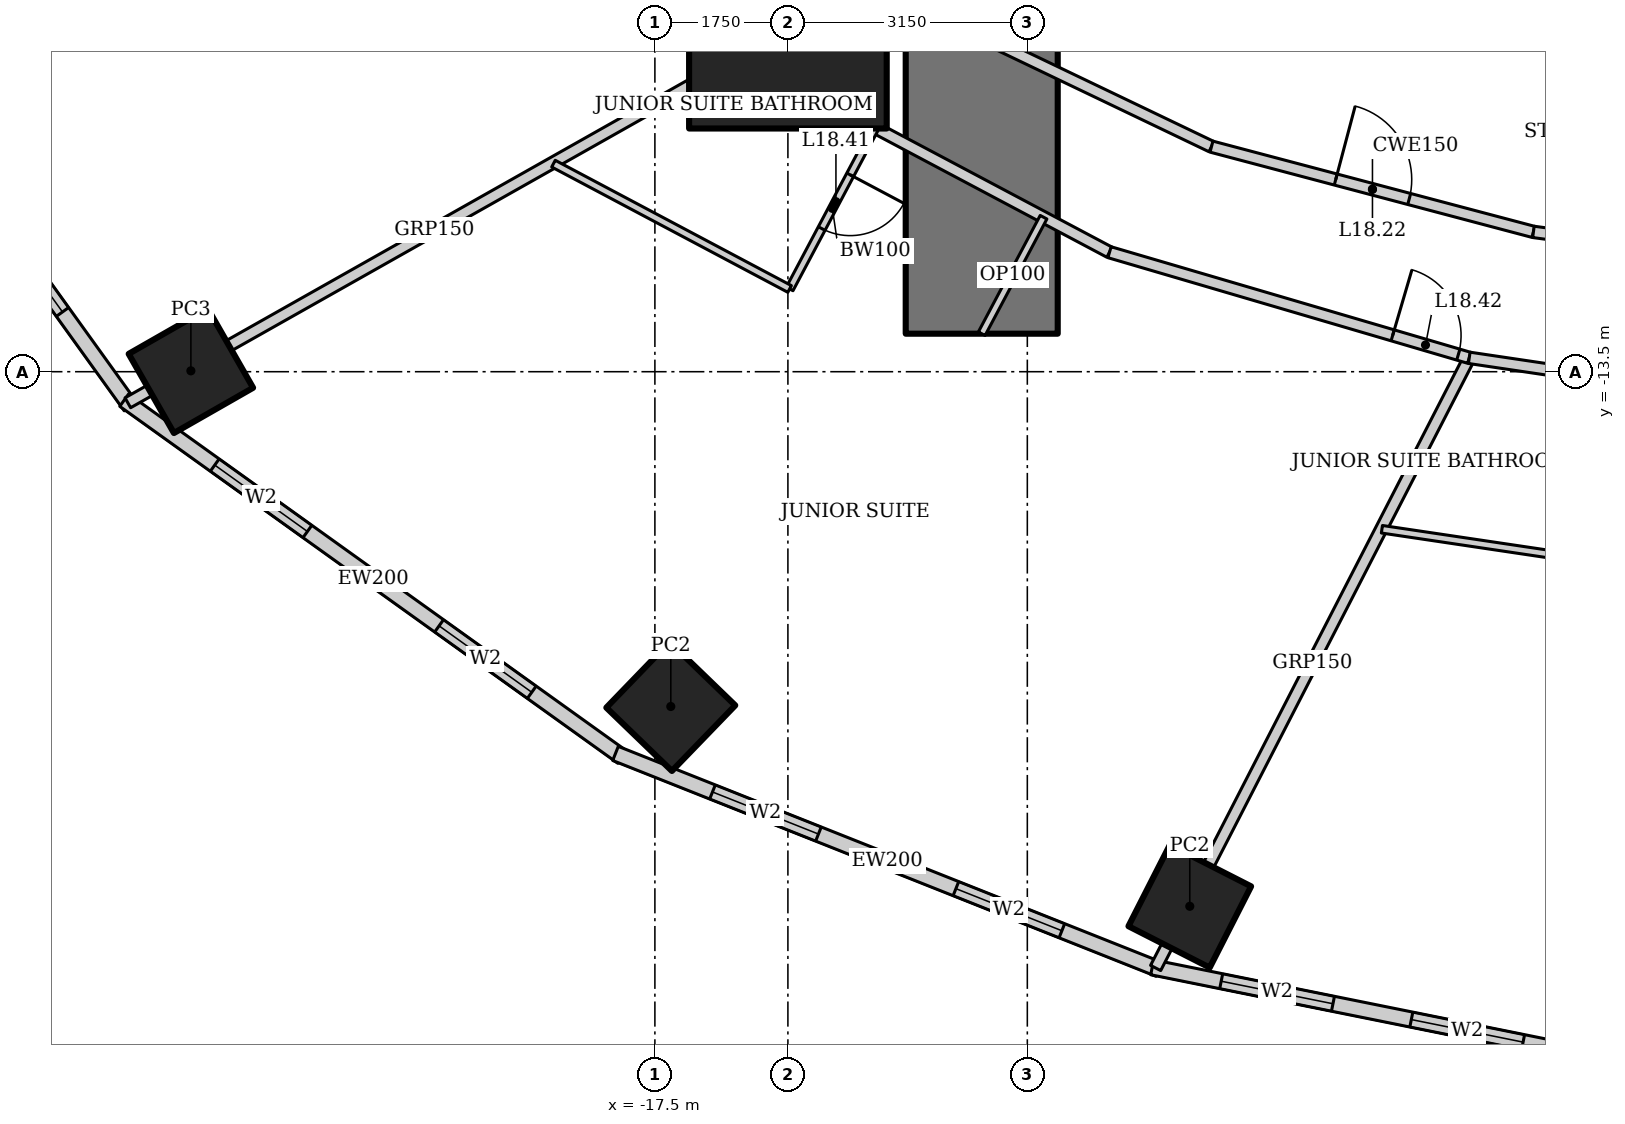
"""IFC4 building model, lengths in metres.
Left out: names, types, materials, properties, quantities, classifications, styles, units other than length and angle.
Written with IfcOpenShell. Run it as: python <this file> out.ifc"""

import sys

from ifc_helpers import new_model, si_unit, direction, frame, frame_2d, origin, origin_2d, place, context, subcontext, project, spatial, rectangle, hollow_rectangle, extrude, element, fill, save


model = new_model("IFC4")
c1 = context("Model", 3, precision=1e-05, world=origin(), true_north=direction((0.0, 1.0)))
c2 = subcontext(c1, "Body", "Model", "MODEL_VIEW")
j1 = project(units=[si_unit("LENGTHUNIT", "METRE"), si_unit("PLANEANGLEUNIT", "RADIAN")], contexts=[c1])
p1 = place(None, origin())
s1 = spatial("IfcSite", under=j1, at=p1, CompositionType="ELEMENT")
p2 = place(p1, origin())
s2 = spatial("IfcBuilding", under=s1, at=p2, CompositionType="ELEMENT")
p3 = place(p2, frame((0.0, 0.0, 80.2)))
s3 = spatial("IfcBuildingStorey", under=s2, at=p3, CompositionType="ELEMENT", Elevation=80.2)
p4 = place(p3, frame((-15.75, -9.0, 0.0), z_axis=(0.0, 0.0, 1.0), x_axis=(1.0, 0.0, 0.0)))
e1 = element("IfcColumn", 1, at=p4, inside=s3, PredefinedType="COLUMN", context=c2, shape_type="SweptSolid", body=[
    extrude(hollow_rectangle(XDim=2.6, YDim=2.6, WallThickness=0.13, at=origin_2d()), origin(), (0.0, 0.0, 1.0), 3.6),
])
p5 = place(p3, frame((-23.605, -13.489, 0.0), z_axis=(0.0, 0.0, 1.0), x_axis=(0.86824298017, 0.496139221777, 0.0)))
e2 = element("IfcColumn", 2, at=p5, inside=s3, PredefinedType="COLUMN", context=c2, shape_type="SweptSolid", body=[
    extrude(hollow_rectangle(XDim=1.2, YDim=1.2, WallThickness=0.12, at=origin_2d()), origin(), (0.0, 0.0, 1.0), 3.6),
])
for number, where, z_axis, x_axis in (
    (3, (-17.291, -17.905, 0.0), (0.0, 0.0, 1.0), (0.695, 0.719, 0.0)),
    (4, (-10.463, -20.534, 0.0), (0.0, 0.0, 1.0), (0.454, 0.891, 0.0)),
):
    element("IfcColumn", number, at=place(p3, frame(where, z_axis=z_axis, x_axis=x_axis)), inside=s3, PredefinedType="COLUMN", context=c2, shape_type="SweptSolid", body=[
        extrude(hollow_rectangle(XDim=1.2, YDim=1.2, WallThickness=0.1, at=origin_2d()), origin(), (0.0, 0.0, 1.0), 3.6),
    ])
p6 = place(p3, frame((-13.2, 13.0, 0.0), z_axis=(0.0, 0.0, 1.0), x_axis=(0.0, -1.0, 0.0)))
e5 = element("IfcWall", 5, at=p6, inside=s3, PredefinedType="SHEAR", context=c2, shape_type="SweptSolid", body=[
    extrude(rectangle(XDim=26.0, YDim=2.0, at=frame_2d((13.0, 0.0))), origin(), (0.0, 0.0, 1.0), 3.6),
])
p7 = place(p6, frame((12.1, 0.0, 0.0)))
e6 = element("IfcOpeningElement", 6, at=p7, cuts=e5, PredefinedType="OPENING", context=c2, shape_type="SweptSolid", body=[
    extrude(rectangle(XDim=1.8, YDim=2.1, at=frame_2d((0.9, 1.05))), frame((0.0, 1.01, 0.0), z_axis=(0.0, -1.0, 0.0), x_axis=(1.0, 0.0, 0.0)), (0.0, 0.0, 1.0), 2.02),
])
p8 = place(p3, frame((-29.26, -7.2, 0.0), z_axis=(0.0, 0.0, 1.0), x_axis=(0.583937613703, -0.811798536155, 0.0)))
e7 = element("IfcWall", 7, at=p8, inside=s3, PredefinedType="SOLIDWALL", context=c2, shape_type="SweptSolid", body=[
    extrude(rectangle(XDim=8.323, YDim=0.2, at=frame_2d((4.162, 0.0))), origin(), (0.0, 0.0, 1.0), 3.45),
])
p9 = place(p8, frame((1.531, 0.0, 0.5)))
e8 = element("IfcOpeningElement", 8, at=p9, cuts=e7, PredefinedType="OPENING", context=c2, shape_type="SweptSolid", body=[
    extrude(rectangle(XDim=1.5, YDim=2.2, at=frame_2d((0.75, 1.1))), frame((0.0, 0.11, 0.0), z_axis=(0.0, -1.0, 0.0), x_axis=(1.0, 0.0, 0.0)), (0.0, 0.0, 1.0), 0.22),
])
p10 = place(p8, frame((5.292, 0.0, 0.5)))
e9 = element("IfcOpeningElement", 9, at=p10, cuts=e7, PredefinedType="OPENING", context=c2, shape_type="SweptSolid", body=[
    extrude(rectangle(XDim=1.5, YDim=2.2, at=frame_2d((0.75, 1.1))), frame((0.0, 0.11, 0.0), z_axis=(0.0, -1.0, 0.0), x_axis=(1.0, 0.0, 0.0)), (0.0, 0.0, 1.0), 0.22),
])
p11 = place(p3, frame((-24.482, -13.875, 0.0), z_axis=(0.0, 0.0, 1.0), x_axis=(0.812791321576, -0.582554948112, 0.0)))
e10 = element("IfcWall", 10, at=p11, inside=s3, PredefinedType="SOLIDWALL", context=c2, shape_type="SweptSolid", body=[
    extrude(rectangle(XDim=8.063, YDim=0.2, at=frame_2d((4.032, 0.0))), origin(), (0.0, 0.0, 1.0), 3.45),
])
p12 = place(p11, frame((1.466, 0.0, 0.5)))
e11 = element("IfcOpeningElement", 11, at=p12, cuts=e10, PredefinedType="OPENING", context=c2, shape_type="SweptSolid", body=[
    extrude(rectangle(XDim=1.5, YDim=2.2, at=frame_2d((0.75, 1.1))), frame((0.0, 0.11, 0.0), z_axis=(0.0, -1.0, 0.0), x_axis=(1.0, 0.0, 0.0)), (0.0, 0.0, 1.0), 0.22),
])
p13 = place(p11, frame((5.097, 0.0, 0.5)))
e12 = element("IfcOpeningElement", 12, at=p13, cuts=e10, PredefinedType="OPENING", context=c2, shape_type="SweptSolid", body=[
    extrude(rectangle(XDim=1.5, YDim=2.2, at=frame_2d((0.75, 1.1))), frame((0.0, 0.11, 0.0), z_axis=(0.0, -1.0, 0.0), x_axis=(1.0, 0.0, 0.0)), (0.0, 0.0, 1.0), 0.22),
])
p14 = place(p3, frame((-18.018, -18.523, 0.0), z_axis=(0.0, 0.0, 1.0), x_axis=(0.929358351251, -0.369178892895, 0.0)))
e13 = element("IfcWall", 13, at=p14, inside=s3, PredefinedType="SOLIDWALL", context=c2, shape_type="SweptSolid", body=[
    extrude(rectangle(XDim=7.692, YDim=0.2, at=frame_2d((3.846, 0.0))), origin(), (0.0, 0.0, 1.0), 3.45),
])
p15 = place(p14, frame((1.373, 0.0, 0.5)))
e14 = element("IfcOpeningElement", 14, at=p15, cuts=e13, PredefinedType="OPENING", context=c2, shape_type="SweptSolid", body=[
    extrude(rectangle(XDim=1.5, YDim=2.2, at=frame_2d((0.75, 1.1))), frame((0.0, 0.11, 0.0), z_axis=(0.0, -1.0, 0.0), x_axis=(1.0, 0.0, 0.0)), (0.0, 0.0, 1.0), 0.22),
])
p16 = place(p14, frame((4.819, 0.0, 0.5)))
e15 = element("IfcOpeningElement", 15, at=p16, cuts=e13, PredefinedType="OPENING", context=c2, shape_type="SweptSolid", body=[
    extrude(rectangle(XDim=1.5, YDim=2.2, at=frame_2d((0.75, 1.1))), frame((0.0, 0.11, 0.0), z_axis=(0.0, -1.0, 0.0), x_axis=(1.0, 0.0, 0.0)), (0.0, 0.0, 1.0), 0.22),
])
p17 = place(p3, frame((-10.957, -21.337, 0.0), z_axis=(0.0, 0.0, 1.0), x_axis=(0.980251657452, -0.197754110105, 0.0)))
e16 = element("IfcWall", 16, at=p17, inside=s3, PredefinedType="SOLIDWALL", context=c2, shape_type="SweptSolid", body=[
    extrude(rectangle(XDim=5.904, YDim=0.2, at=frame_2d((2.952, 0.0))), origin(), (0.0, 0.0, 1.0), 3.45),
])
p18 = place(p17, frame((0.926, 0.0, 0.5)))
e17 = element("IfcOpeningElement", 17, at=p18, cuts=e16, PredefinedType="OPENING", context=c2, shape_type="SweptSolid", body=[
    extrude(rectangle(XDim=1.5, YDim=2.2, at=frame_2d((0.75, 1.1))), frame((0.0, 0.11, 0.0), z_axis=(0.0, -1.0, 0.0), x_axis=(1.0, 0.0, 0.0)), (0.0, 0.0, 1.0), 0.22),
])
p19 = place(p17, frame((3.478, 0.0, 0.5)))
e18 = element("IfcOpeningElement", 18, at=p19, cuts=e16, PredefinedType="OPENING", context=c2, shape_type="SweptSolid", body=[
    extrude(rectangle(XDim=1.5, YDim=2.2, at=frame_2d((0.75, 1.1))), frame((0.0, 0.11, 0.0), z_axis=(0.0, -1.0, 0.0), x_axis=(1.0, 0.0, 0.0)), (0.0, 0.0, 1.0), 0.22),
])
p20 = place(p3, frame((-24.435, -13.909, 0.0), z_axis=(0.0, 0.0, 1.0), x_axis=(0.870744406136, 0.491735883563, 0.0)))
e19 = element("IfcWall", 19, at=p20, inside=s3, PredefinedType="PARTITIONING", context=c2, shape_type="SweptSolid", body=[
    extrude(rectangle(XDim=9.263, YDim=0.15, at=frame_2d((4.631, 0.0))), origin(), (0.0, 0.0, 1.0), 2.693),
])
p21 = place(p3, frame((-10.912, -21.346, 0.0), z_axis=(0.0, 0.0, 1.0), x_axis=(0.457117602022, 0.889406261458, 0.0)))
e20 = element("IfcWall", 20, at=p21, inside=s3, PredefinedType="PARTITIONING", context=c2, shape_type="SweptSolid", body=[
    extrude(rectangle(XDim=9.027, YDim=0.15, at=frame_2d((4.513, 0.0))), origin(), (0.0, 0.0, 1.0), 2.528),
])
p22 = place(p3, frame((-20.484, -5.107, 0.0), z_axis=(0.0, 0.0, 1.0), x_axis=(0.695871090686, -0.71816671125, 0.0)))
e21 = element("IfcWall", 21, at=p22, inside=s3, PredefinedType="PARTITIONING", context=c2, shape_type="SweptSolid", body=[
    extrude(rectangle(XDim=5.913, YDim=0.15, at=frame_2d((2.957, 0.0))), origin(), (0.0, 0.0, 1.0), 3.45),
])
p23 = place(p22, frame((0.15, 0.0, 0.0)))
e22 = element("IfcOpeningElement", 22, at=p23, cuts=e21, PredefinedType="OPENING", context=c2, shape_type="SweptSolid", body=[
    extrude(rectangle(XDim=0.9, YDim=2.1, at=frame_2d((0.45, 1.05))), frame((0.0, 0.085, 0.0), z_axis=(0.0, -1.0, 0.0), x_axis=(1.0, 0.0, 0.0)), (0.0, 0.0, 1.0), 0.17),
])
p24 = place(p3, frame((-16.369, -9.354, 0.0), z_axis=(0.0, 0.0, 1.0), x_axis=(0.883334368785, -0.468743419071, 0.0)))
e23 = element("IfcWall", 23, at=p24, inside=s3, PredefinedType="PARTITIONING", context=c2, shape_type="SweptSolid", body=[
    extrude(rectangle(XDim=5.491, YDim=0.15, at=frame_2d((2.746, 0.0))), origin(), (0.0, 0.0, 1.0), 3.45),
])
p25 = place(p3, frame((-11.519, -11.928, 0.0), z_axis=(0.0, 0.0, 1.0), x_axis=(0.959496227294, -0.281721475589, 0.0)))
e24 = element("IfcWall", 24, at=p25, inside=s3, PredefinedType="PARTITIONING", context=c2, shape_type="SweptSolid", body=[
    extrude(rectangle(XDim=4.933, YDim=0.15, at=frame_2d((2.466, 0.0))), origin(), (0.0, 0.0, 1.0), 3.45),
])
p26 = place(p25, frame((3.883, 0.0, 0.0)))
e25 = element("IfcOpeningElement", 25, at=p26, cuts=e24, PredefinedType="OPENING", context=c2, shape_type="SweptSolid", body=[
    extrude(rectangle(XDim=0.9, YDim=2.1, at=frame_2d((0.45, 1.05))), frame((0.0, 0.085, 0.0), z_axis=(0.0, -1.0, 0.0), x_axis=(1.0, 0.0, 0.0)), (0.0, 0.0, 1.0), 0.17),
])
p27 = place(p3, frame((-6.786, -13.317, 0.0), z_axis=(0.0, 0.0, 1.0), x_axis=(0.989107488999, -0.14719502439, 0.0)))
e26 = element("IfcWall", 26, at=p27, inside=s3, PredefinedType="PARTITIONING", context=c2, shape_type="SweptSolid", body=[
    extrude(rectangle(XDim=3.627, YDim=0.15, at=frame_2d((1.814, 0.0))), origin(), (0.0, 0.0, 1.0), 3.45),
])
p28 = place(p3, frame((-14.673, -8.385, 0.0), z_axis=(0.0, 0.0, 1.0), x_axis=(0.901869692799, -0.43200816799, 0.0)))
e27 = element("IfcWall", 27, at=p28, inside=s3, PredefinedType="PARTITIONING", context=c2, shape_type="SweptSolid", body=[
    extrude(rectangle(XDim=4.986, YDim=0.15, at=frame_2d((2.493, 0.0))), origin(), (0.0, 0.0, 1.0), 3.45),
])
p29 = place(p3, frame((-10.177, -10.539, 0.0), z_axis=(0.0, 0.0, 1.0), x_axis=(0.966672790407, -0.256015070428, 0.0)))
e28 = element("IfcWall", 28, at=p29, inside=s3, PredefinedType="PARTITIONING", context=c2, shape_type="SweptSolid", body=[
    extrude(rectangle(XDim=4.382, YDim=0.15, at=frame_2d((2.191, 0.0))), origin(), (0.0, 0.0, 1.0), 3.45),
])
p30 = place(p29, frame((1.691, 0.0, 0.0)))
e29 = element("IfcOpeningElement", 29, at=p30, cuts=e28, PredefinedType="OPENING", context=c2, shape_type="SweptSolid", body=[
    extrude(rectangle(XDim=1.0, YDim=2.1, at=frame_2d((0.5, 1.05))), frame((0.0, 0.085, 0.0), z_axis=(0.0, -1.0, 0.0), x_axis=(1.0, 0.0, 0.0)), (0.0, 0.0, 1.0), 0.17),
])
p31 = place(p3, frame((-5.941, -11.66, 0.0), z_axis=(0.0, 0.0, 1.0), x_axis=(0.991129053928, -0.13290296633, 0.0)))
e30 = element("IfcWall", 30, at=p31, inside=s3, PredefinedType="PARTITIONING", context=c2, shape_type="SweptSolid", body=[
    extrude(rectangle(XDim=3.18, YDim=0.15, at=frame_2d((1.59, 0.0))), origin(), (0.0, 0.0, 1.0), 3.45),
])
p32 = place(p3, frame((-14.602, -10.291, 0.0), z_axis=(0.0, 0.0, 1.0), x_axis=(-0.468770886208, -0.883319792739, 0.0)))
e31 = element("IfcWall", 31, at=p32, inside=s3, PredefinedType="PARTITIONING", context=c2, shape_type="SweptSolid", body=[
    extrude(rectangle(XDim=2.4, YDim=0.1, at=frame_2d((1.2, 0.0))), origin(), (0.0, 0.0, 1.0), 3.45),
])
p33 = place(p32, frame((0.7, 0.0, 0.0)))
e32 = element("IfcOpeningElement", 32, at=p33, cuts=e31, PredefinedType="OPENING", context=c2, shape_type="SweptSolid", body=[
    extrude(rectangle(XDim=0.8, YDim=2.1, at=frame_2d((0.4, 1.05))), frame((0.0, 0.06, 0.0), z_axis=(0.0, -1.0, 0.0), x_axis=(1.0, 0.0, 0.0)), (0.0, 0.0, 1.0), 0.12),
])
p34 = place(p3, frame((-15.727, -12.411, 0.0), z_axis=(0.0, 0.0, 1.0), x_axis=(-0.88335195308, 0.468710280439, 0.0)))
e33 = element("IfcWall", 33, at=p34, inside=s3, PredefinedType="PARTITIONING", context=c2, shape_type="SweptSolid", body=[
    extrude(rectangle(XDim=3.518, YDim=0.1, at=frame_2d((1.759, 0.0))), origin(), (0.0, 0.0, 1.0), 3.45),
])
p35 = place(p3, frame((-5.161, -15.986, 0.0), z_axis=(0.0, 0.0, 1.0), x_axis=(-0.98910744157, 0.147195343104, 0.0)))
e34 = element("IfcWall", 34, at=p35, inside=s3, PredefinedType="PARTITIONING", context=c2, shape_type="SweptSolid", body=[
    extrude(rectangle(XDim=2.805, YDim=0.1, at=frame_2d((1.402, 0.0))), origin(), (0.0, 0.0, 1.0), 3.45),
])
p36 = place(p3, frame((-13.2, -13.0, 0.0), z_axis=(0.0, 0.0, 1.0), x_axis=(0.46874717052, 0.88333237806, 0.0)))
e35 = element("IfcWall", 35, at=p36, inside=s3, PredefinedType="PARTITIONING", context=c2, shape_type="SweptSolid", body=[
    extrude(rectangle(XDim=1.735, YDim=0.1, at=frame_2d((0.868, 0.0))), origin(), (0.0, 0.0, 1.0), 3.45),
])
p37 = place(p10, origin())
e36 = element("IfcWindow", 36, at=p37, inside=s3, PartitioningType="SINGLE_PANEL", PredefinedType="WINDOW", context=c2, shape_type="SweptSolid", body=[
    extrude(rectangle(XDim=1.5, YDim=2.2, at=frame_2d((0.75, 1.1))), frame((0.0, 0.03, 0.0), z_axis=(0.0, -1.0, 0.0), x_axis=(1.0, 0.0, 0.0)), (0.0, 0.0, 1.0), 0.06),
])
fill(e9, e36)
p38 = place(p12, origin())
e37 = element("IfcWindow", 37, at=p38, inside=s3, PartitioningType="SINGLE_PANEL", PredefinedType="WINDOW", context=c2, shape_type="SweptSolid", body=[
    extrude(rectangle(XDim=1.5, YDim=2.2, at=frame_2d((0.75, 1.1))), frame((0.0, 0.03, 0.0), z_axis=(0.0, -1.0, 0.0), x_axis=(1.0, 0.0, 0.0)), (0.0, 0.0, 1.0), 0.06),
])
fill(e11, e37)
p39 = place(p13, origin())
e38 = element("IfcWindow", 38, at=p39, inside=s3, PartitioningType="SINGLE_PANEL", PredefinedType="WINDOW", context=c2, shape_type="SweptSolid", body=[
    extrude(rectangle(XDim=1.5, YDim=2.2, at=frame_2d((0.75, 1.1))), frame((0.0, 0.03, 0.0), z_axis=(0.0, -1.0, 0.0), x_axis=(1.0, 0.0, 0.0)), (0.0, 0.0, 1.0), 0.06),
])
fill(e12, e38)
p40 = place(p15, origin())
e39 = element("IfcWindow", 39, at=p40, inside=s3, PartitioningType="SINGLE_PANEL", PredefinedType="WINDOW", context=c2, shape_type="SweptSolid", body=[
    extrude(rectangle(XDim=1.5, YDim=2.2, at=frame_2d((0.75, 1.1))), frame((0.0, 0.03, 0.0), z_axis=(0.0, -1.0, 0.0), x_axis=(1.0, 0.0, 0.0)), (0.0, 0.0, 1.0), 0.06),
])
fill(e14, e39)
p41 = place(p16, origin())
e40 = element("IfcWindow", 40, at=p41, inside=s3, PartitioningType="SINGLE_PANEL", PredefinedType="WINDOW", context=c2, shape_type="SweptSolid", body=[
    extrude(rectangle(XDim=1.5, YDim=2.2, at=frame_2d((0.75, 1.1))), frame((0.0, 0.03, 0.0), z_axis=(0.0, -1.0, 0.0), x_axis=(1.0, 0.0, 0.0)), (0.0, 0.0, 1.0), 0.06),
])
fill(e15, e40)
p42 = place(p18, origin())
e41 = element("IfcWindow", 41, at=p42, inside=s3, PartitioningType="SINGLE_PANEL", PredefinedType="WINDOW", context=c2, shape_type="SweptSolid", body=[
    extrude(rectangle(XDim=1.5, YDim=2.2, at=frame_2d((0.75, 1.1))), frame((0.0, 0.03, 0.0), z_axis=(0.0, -1.0, 0.0), x_axis=(1.0, 0.0, 0.0)), (0.0, 0.0, 1.0), 0.06),
])
fill(e17, e41)
p43 = place(p19, origin())
e42 = element("IfcWindow", 42, at=p43, inside=s3, PartitioningType="SINGLE_PANEL", PredefinedType="WINDOW", context=c2, shape_type="SweptSolid", body=[
    extrude(rectangle(XDim=1.5, YDim=2.2, at=frame_2d((0.75, 1.1))), frame((0.0, 0.03, 0.0), z_axis=(0.0, -1.0, 0.0), x_axis=(1.0, 0.0, 0.0)), (0.0, 0.0, 1.0), 0.06),
])
fill(e18, e42)
p44 = place(p30, origin())
e43 = element("IfcDoor", 43, at=p44, inside=s3, OperationType="SINGLE_SWING_LEFT", PredefinedType="DOOR", context=c2, shape_type="SweptSolid", body=[
    extrude(rectangle(XDim=1.0, YDim=2.1, at=frame_2d((0.5, 1.05))), frame((0.0, 0.025, 0.0), z_axis=(0.0, -1.0, 0.0), x_axis=(1.0, 0.0, 0.0)), (0.0, 0.0, 1.0), 0.05),
])
fill(e29, e43)
p45 = place(p33, origin())
e44 = element("IfcDoor", 44, at=p45, inside=s3, OperationType="SINGLE_SWING_LEFT", PredefinedType="DOOR", context=c2, shape_type="SweptSolid", body=[
    extrude(rectangle(XDim=0.8, YDim=2.1, at=frame_2d((0.4, 1.05))), frame((0.0, 0.025, 0.0), z_axis=(0.0, -1.0, 0.0), x_axis=(1.0, 0.0, 0.0)), (0.0, 0.0, 1.0), 0.05),
])
fill(e32, e44)
p46 = place(p26, origin())
e45 = element("IfcDoor", 45, at=p46, inside=s3, OperationType="SINGLE_SWING_LEFT", PredefinedType="DOOR", context=c2, shape_type="SweptSolid", body=[
    extrude(rectangle(XDim=0.9, YDim=2.1, at=frame_2d((0.45, 1.05))), frame((0.0, 0.025, 0.0), z_axis=(0.0, -1.0, 0.0), x_axis=(1.0, 0.0, 0.0)), (0.0, 0.0, 1.0), 0.05),
])
fill(e25, e45)
save(model, sys.argv[1])
